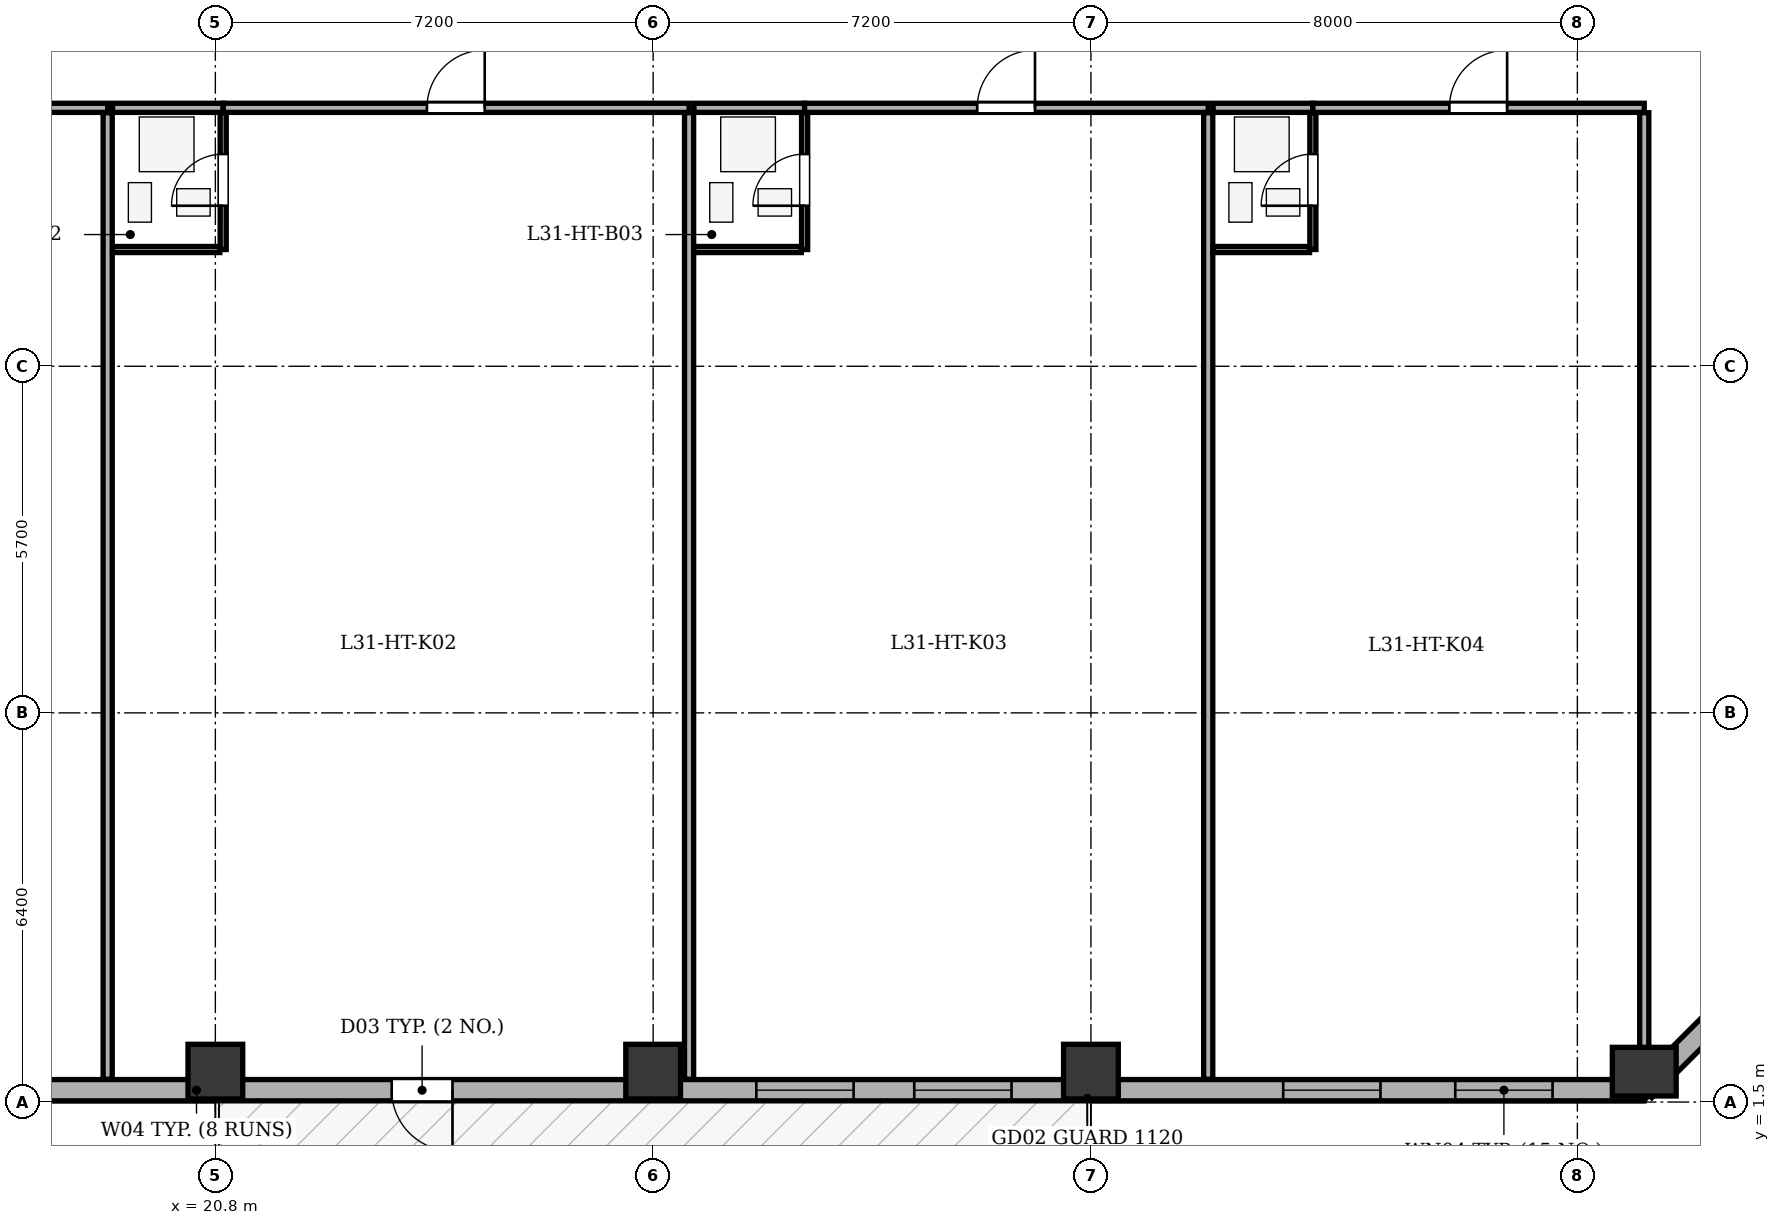
"""IFC4 building model, lengths in metres.
Left out: names, types, materials, properties, quantities, classifications, styles, units other than length and angle.
Written with IfcOpenShell. Run it as: python <this file> out.ifc"""

import sys

from ifc_helpers import new_model, si_unit, direction, frame, frame_2d, origin, origin_2d, place, context, subcontext, project, spatial, rectangle, extrude, element, fill, save


model = new_model("IFC4")
c1 = context("Model", 3, precision=1e-05, world=origin(), true_north=direction((0.0, 1.0)))
c2 = subcontext(c1, "Body", "Model", "MODEL_VIEW")
j1 = project(units=[si_unit("LENGTHUNIT", "METRE"), si_unit("PLANEANGLEUNIT", "RADIAN")], contexts=[c1])
p1 = place(None, origin())
s1 = spatial("IfcSite", under=j1, at=p1, CompositionType="ELEMENT")
p2 = place(p1, origin())
s2 = spatial("IfcBuilding", under=s1, at=p2, CompositionType="ELEMENT")
p3 = place(p2, frame((0.0, 0.0, 127.3)))
s3 = spatial("IfcBuildingStorey", under=s2, at=p3, CompositionType="ELEMENT", Elevation=127.3)
for number, where, z_axis, x_axis in (
    (1, (20.8, 2.0, 0.0), (0.0, 0.0, 1.0), (1.0, 0.0, 0.0)),
    (2, (28.0, 2.0, 0.0), (0.0, 0.0, 1.0), (1.0, 0.0, 0.0)),
    (3, (35.2, 2.0, 0.0), (0.0, 0.0, 1.0), (1.0, 0.0, 0.0)),
):
    element("IfcColumn", number, at=place(p3, frame(where, z_axis=z_axis, x_axis=x_axis)), inside=s3, PredefinedType="COLUMN", context=c2, shape_type="SweptSolid", body=[
        extrude(rectangle(XDim=0.9, YDim=0.9, at=origin_2d()), origin(), (0.0, 0.0, 1.0), 3.5),
    ])
p4 = place(p3, frame((44.3, 2.0, 0.0), z_axis=(0.0, 0.0, 1.0), x_axis=(1.0, 0.0, 0.0)))
e4 = element("IfcColumn", 4, at=p4, inside=s3, PredefinedType="COLUMN", context=c2, shape_type="SweptSolid", body=[
    extrude(rectangle(XDim=0.8, YDim=1.05, at=origin_2d()), origin(), (0.0, 0.0, 1.0), 3.5),
])
p5 = place(p3, frame((44.3, 1.695, 0.0), z_axis=(0.0, 0.0, 1.0), x_axis=(-1.0, 0.0, 0.0)))
e5 = element("IfcWall", 5, at=p5, inside=s3, PredefinedType="STANDARD", context=c2, shape_type="SweptSolid", body=[
    extrude(rectangle(XDim=35.0, YDim=0.35, at=frame_2d((17.5, 0.0))), origin(), (0.0, 0.0, 1.0), 2.785),
])
p6 = place(p5, frame((19.6, 0.0, 0.0)))
e6 = element("IfcOpeningElement", 6, at=p6, cuts=e5, PredefinedType="OPENING", context=c2, shape_type="SweptSolid", body=[
    extrude(rectangle(XDim=1.0, YDim=2.02, at=frame_2d((0.5, 1.01))), frame((0.0, 0.185, 0.0), z_axis=(0.0, -1.0, 0.0), x_axis=(1.0, 0.0, 0.0)), (0.0, 0.0, 1.0), 0.37),
])
p7 = place(p5, frame((1.508, 0.0, 0.75)))
e7 = element("IfcOpeningElement", 7, at=p7, cuts=e5, PredefinedType="OPENING", context=c2, shape_type="SweptSolid", body=[
    extrude(rectangle(XDim=1.6, YDim=1.75, at=frame_2d((0.8, 0.875))), frame((0.0, 0.185, 0.0), z_axis=(0.0, -1.0, 0.0), x_axis=(1.0, 0.0, 0.0)), (0.0, 0.0, 1.0), 0.37),
])
p8 = place(p5, frame((4.338, 0.0, 0.75)))
e8 = element("IfcOpeningElement", 8, at=p8, cuts=e5, PredefinedType="OPENING", context=c2, shape_type="SweptSolid", body=[
    extrude(rectangle(XDim=1.6, YDim=1.75, at=frame_2d((0.8, 0.875))), frame((0.0, 0.185, 0.0), z_axis=(0.0, -1.0, 0.0), x_axis=(1.0, 0.0, 0.0)), (0.0, 0.0, 1.0), 0.37),
])
p9 = place(p5, frame((10.406, 0.0, 0.75)))
e9 = element("IfcOpeningElement", 9, at=p9, cuts=e5, PredefinedType="OPENING", context=c2, shape_type="SweptSolid", body=[
    extrude(rectangle(XDim=1.6, YDim=1.75, at=frame_2d((0.8, 0.875))), frame((0.0, 0.185, 0.0), z_axis=(0.0, -1.0, 0.0), x_axis=(1.0, 0.0, 0.0)), (0.0, 0.0, 1.0), 0.37),
])
p10 = place(p5, frame((13.003, 0.0, 0.75)))
e10 = element("IfcOpeningElement", 10, at=p10, cuts=e5, PredefinedType="OPENING", context=c2, shape_type="SweptSolid", body=[
    extrude(rectangle(XDim=1.6, YDim=1.75, at=frame_2d((0.8, 0.875))), frame((0.0, 0.185, 0.0), z_axis=(0.0, -1.0, 0.0), x_axis=(1.0, 0.0, 0.0)), (0.0, 0.0, 1.0), 0.37),
])
p11 = place(p5, frame((27.02, 0.0, 0.75)))
e11 = element("IfcOpeningElement", 11, at=p11, cuts=e5, PredefinedType="OPENING", context=c2, shape_type="SweptSolid", body=[
    extrude(rectangle(XDim=1.6, YDim=1.75, at=frame_2d((0.8, 0.875))), frame((0.0, 0.185, 0.0), z_axis=(0.0, -1.0, 0.0), x_axis=(1.0, 0.0, 0.0)), (0.0, 0.0, 1.0), 0.37),
])
p12 = place(p5, frame((30.551, 0.0, 0.75)))
e12 = element("IfcOpeningElement", 12, at=p12, cuts=e5, PredefinedType="OPENING", context=c2, shape_type="SweptSolid", body=[
    extrude(rectangle(XDim=2.1, YDim=1.75, at=frame_2d((1.05, 0.875))), frame((0.0, 0.185, 0.0), z_axis=(0.0, -1.0, 0.0), x_axis=(1.0, 0.0, 0.0)), (0.0, 0.0, 1.0), 0.37),
])
p13 = place(p3, frame((49.105, 6.5, 0.0), z_axis=(0.0, 0.0, 1.0), x_axis=(-0.707106781187, -0.707106781187, 0.0)))
e13 = element("IfcWall", 13, at=p13, inside=s3, PredefinedType="STANDARD", context=c2, shape_type="SweptSolid", body=[
    extrude(rectangle(XDim=6.795, YDim=0.35, at=frame_2d((3.397, 0.0))), origin(), (0.0, 0.0, 1.0), 2.785),
])
p14 = place(p13, frame((2.698, 0.0, 0.75)))
e14 = element("IfcOpeningElement", 14, at=p14, cuts=e13, PredefinedType="OPENING", context=c2, shape_type="SweptSolid", body=[
    extrude(rectangle(XDim=1.4, YDim=1.65, at=frame_2d((0.7, 0.825))), frame((0.0, 0.185, 0.0), z_axis=(0.0, -1.0, 0.0), x_axis=(1.0, 0.0, 0.0)), (0.0, 0.0, 1.0), 0.37),
])
p15 = place(p3, frame((12.05, 17.85, 0.0), z_axis=(0.0, 0.0, 1.0), x_axis=(1.0, 0.0, 0.0)))
e15 = element("IfcWall", 15, at=p15, inside=s3, PredefinedType="PARTITIONING", context=c2, shape_type="SweptSolid", body=[
    extrude(rectangle(XDim=6.979, YDim=0.15, at=frame_2d((3.49, 0.0))), origin(), (0.0, 0.0, 1.0), 3.2),
])
p16 = place(p15, frame((3.01, 0.0, 0.0)))
e16 = element("IfcOpeningElement", 16, at=p16, cuts=e15, PredefinedType="OPENING", context=c2, shape_type="SweptSolid", body=[
    extrude(rectangle(XDim=0.95, YDim=2.1, at=frame_2d((0.475, 1.05))), frame((0.0, 0.085, 0.0), z_axis=(0.0, -1.0, 0.0), x_axis=(1.0, 0.0, 0.0)), (0.0, 0.0, 1.0), 0.17),
])
p17 = place(p3, frame((19.029, 1.875, 0.0), z_axis=(0.0, 0.0, 1.0), x_axis=(0.0, 1.0, 0.0)))
e17 = element("IfcWall", 17, at=p17, inside=s3, PredefinedType="PARTITIONING", context=c2, shape_type="SweptSolid", body=[
    extrude(rectangle(XDim=15.895, YDim=0.15, at=frame_2d((7.948, 0.0))), origin(), (0.0, 0.0, 1.0), 3.2),
])
p18 = place(p3, frame((19.109, 17.85, 0.0), z_axis=(0.0, 0.0, 1.0), x_axis=(1.0, 0.0, 0.0)))
e18 = element("IfcWall", 18, at=p18, inside=s3, PredefinedType="PARTITIONING", context=c2, shape_type="SweptSolid", body=[
    extrude(rectangle(XDim=1.82, YDim=0.15, at=frame_2d((0.91, 0.0))), origin(), (0.0, 0.0, 1.0), 3.2),
])
p19 = place(p3, frame((20.929, 17.85, 0.0), z_axis=(0.0, 0.0, 1.0), x_axis=(1.0, 0.0, 0.0)))
e19 = element("IfcWall", 19, at=p19, inside=s3, PredefinedType="PARTITIONING", context=c2, shape_type="SweptSolid", body=[
    extrude(rectangle(XDim=7.662, YDim=0.15, at=frame_2d((3.831, 0.0))), origin(), (0.0, 0.0, 1.0), 3.2),
])
p20 = place(p19, frame((3.351, 0.0, 0.0)))
e20 = element("IfcOpeningElement", 20, at=p20, cuts=e19, PredefinedType="OPENING", context=c2, shape_type="SweptSolid", body=[
    extrude(rectangle(XDim=0.95, YDim=2.1, at=frame_2d((0.475, 1.05))), frame((0.0, 0.085, 0.0), z_axis=(0.0, -1.0, 0.0), x_axis=(1.0, 0.0, 0.0)), (0.0, 0.0, 1.0), 0.17),
])
p21 = place(p3, frame((20.929, 15.52, 0.0), z_axis=(0.0, 0.0, 1.0), x_axis=(0.0, 1.0, 0.0)))
e21 = element("IfcWall", 21, at=p21, inside=s3, PredefinedType="PARTITIONING", context=c2, shape_type="SweptSolid", body=[
    extrude(rectangle(XDim=2.25, YDim=0.1, at=frame_2d((1.125, 0.0))), origin(), (0.0, 0.0, 1.0), 2.535),
])
p22 = place(p21, frame((0.72, 0.0, 0.0)))
e22 = element("IfcOpeningElement", 22, at=p22, cuts=e21, PredefinedType="OPENING", context=c2, shape_type="SweptSolid", body=[
    extrude(rectangle(XDim=0.85, YDim=2.05, at=frame_2d((0.425, 1.025))), frame((0.0, 0.06, 0.0), z_axis=(0.0, -1.0, 0.0), x_axis=(1.0, 0.0, 0.0)), (0.0, 0.0, 1.0), 0.12),
])
p23 = place(p3, frame((19.109, 15.52, 0.0), z_axis=(0.0, 0.0, 1.0), x_axis=(1.0, 0.0, 0.0)))
e23 = element("IfcWall", 23, at=p23, inside=s3, PredefinedType="PARTITIONING", context=c2, shape_type="SweptSolid", body=[
    extrude(rectangle(XDim=1.765, YDim=0.1, at=frame_2d((0.883, 0.0))), origin(), (0.0, 0.0, 1.0), 3.2),
])
p24 = place(p3, frame((28.591, 1.875, 0.0), z_axis=(0.0, 0.0, 1.0), x_axis=(0.0, 1.0, 0.0)))
e24 = element("IfcWall", 24, at=p24, inside=s3, PredefinedType="PARTITIONING", context=c2, shape_type="SweptSolid", body=[
    extrude(rectangle(XDim=15.895, YDim=0.15, at=frame_2d((7.948, 0.0))), origin(), (0.0, 0.0, 1.0), 3.2),
])
p25 = place(p3, frame((28.671, 17.85, 0.0), z_axis=(0.0, 0.0, 1.0), x_axis=(1.0, 0.0, 0.0)))
e25 = element("IfcWall", 25, at=p25, inside=s3, PredefinedType="PARTITIONING", context=c2, shape_type="SweptSolid", body=[
    extrude(rectangle(XDim=1.82, YDim=0.15, at=frame_2d((0.91, 0.0))), origin(), (0.0, 0.0, 1.0), 3.2),
])
p26 = place(p3, frame((30.491, 17.85, 0.0), z_axis=(0.0, 0.0, 1.0), x_axis=(1.0, 0.0, 0.0)))
e26 = element("IfcWall", 26, at=p26, inside=s3, PredefinedType="PARTITIONING", context=c2, shape_type="SweptSolid", body=[
    extrude(rectangle(XDim=6.638, YDim=0.15, at=frame_2d((3.319, 0.0))), origin(), (0.0, 0.0, 1.0), 3.2),
])
p27 = place(p26, frame((2.839, 0.0, 0.0)))
e27 = element("IfcOpeningElement", 27, at=p27, cuts=e26, PredefinedType="OPENING", context=c2, shape_type="SweptSolid", body=[
    extrude(rectangle(XDim=0.95, YDim=2.1, at=frame_2d((0.475, 1.05))), frame((0.0, 0.085, 0.0), z_axis=(0.0, -1.0, 0.0), x_axis=(1.0, 0.0, 0.0)), (0.0, 0.0, 1.0), 0.17),
])
p28 = place(p3, frame((30.491, 15.52, 0.0), z_axis=(0.0, 0.0, 1.0), x_axis=(0.0, 1.0, 0.0)))
e28 = element("IfcWall", 28, at=p28, inside=s3, PredefinedType="PARTITIONING", context=c2, shape_type="SweptSolid", body=[
    extrude(rectangle(XDim=2.25, YDim=0.1, at=frame_2d((1.125, 0.0))), origin(), (0.0, 0.0, 1.0), 3.2),
])
p29 = place(p28, frame((0.72, 0.0, 0.0)))
e29 = element("IfcOpeningElement", 29, at=p29, cuts=e28, PredefinedType="OPENING", context=c2, shape_type="SweptSolid", body=[
    extrude(rectangle(XDim=0.85, YDim=2.05, at=frame_2d((0.425, 1.025))), frame((0.0, 0.06, 0.0), z_axis=(0.0, -1.0, 0.0), x_axis=(1.0, 0.0, 0.0)), (0.0, 0.0, 1.0), 0.12),
])
p30 = place(p3, frame((28.671, 15.52, 0.0), z_axis=(0.0, 0.0, 1.0), x_axis=(1.0, 0.0, 0.0)))
e30 = element("IfcWall", 30, at=p30, inside=s3, PredefinedType="PARTITIONING", context=c2, shape_type="SweptSolid", body=[
    extrude(rectangle(XDim=1.765, YDim=0.1, at=frame_2d((0.883, 0.0))), origin(), (0.0, 0.0, 1.0), 3.2),
])
p31 = place(p3, frame((37.129, 1.875, 0.0), z_axis=(0.0, 0.0, 1.0), x_axis=(0.0, 1.0, 0.0)))
e31 = element("IfcWall", 31, at=p31, inside=s3, PredefinedType="PARTITIONING", context=c2, shape_type="SweptSolid", body=[
    extrude(rectangle(XDim=15.895, YDim=0.15, at=frame_2d((7.948, 0.0))), origin(), (0.0, 0.0, 1.0), 3.2),
])
p32 = place(p3, frame((37.209, 17.85, 0.0), z_axis=(0.0, 0.0, 1.0), x_axis=(1.0, 0.0, 0.0)))
e32 = element("IfcWall", 32, at=p32, inside=s3, PredefinedType="PARTITIONING", context=c2, shape_type="SweptSolid", body=[
    extrude(rectangle(XDim=1.641, YDim=0.15, at=frame_2d((0.821, 0.0))), origin(), (0.0, 0.0, 1.0), 3.2),
])
p33 = place(p3, frame((38.85, 17.85, 0.0), z_axis=(0.0, 0.0, 1.0), x_axis=(1.0, 0.0, 0.0)))
e33 = element("IfcWall", 33, at=p33, inside=s3, PredefinedType="PARTITIONING", context=c2, shape_type="SweptSolid", body=[
    extrude(rectangle(XDim=5.45, YDim=0.15, at=frame_2d((2.725, 0.0))), origin(), (0.0, 0.0, 1.0), 3.2),
])
p34 = place(p33, frame((2.245, 0.0, 0.0)))
e34 = element("IfcOpeningElement", 34, at=p34, cuts=e33, PredefinedType="OPENING", context=c2, shape_type="SweptSolid", body=[
    extrude(rectangle(XDim=0.95, YDim=2.1, at=frame_2d((0.475, 1.05))), frame((0.0, 0.085, 0.0), z_axis=(0.0, -1.0, 0.0), x_axis=(1.0, 0.0, 0.0)), (0.0, 0.0, 1.0), 0.17),
])
p35 = place(p3, frame((38.85, 15.52, 0.0), z_axis=(0.0, 0.0, 1.0), x_axis=(0.0, 1.0, 0.0)))
e35 = element("IfcWall", 35, at=p35, inside=s3, PredefinedType="PARTITIONING", context=c2, shape_type="SweptSolid", body=[
    extrude(rectangle(XDim=2.25, YDim=0.1, at=frame_2d((1.125, 0.0))), origin(), (0.0, 0.0, 1.0), 3.2),
])
p36 = place(p35, frame((0.72, 0.0, 0.0)))
e36 = element("IfcOpeningElement", 36, at=p36, cuts=e35, PredefinedType="OPENING", context=c2, shape_type="SweptSolid", body=[
    extrude(rectangle(XDim=0.85, YDim=2.05, at=frame_2d((0.425, 1.025))), frame((0.0, 0.06, 0.0), z_axis=(0.0, -1.0, 0.0), x_axis=(1.0, 0.0, 0.0)), (0.0, 0.0, 1.0), 0.12),
])
p37 = place(p3, frame((37.209, 15.52, 0.0), z_axis=(0.0, 0.0, 1.0), x_axis=(1.0, 0.0, 0.0)))
e37 = element("IfcWall", 37, at=p37, inside=s3, PredefinedType="PARTITIONING", context=c2, shape_type="SweptSolid", body=[
    extrude(rectangle(XDim=1.586, YDim=0.1, at=frame_2d((0.793, 0.0))), origin(), (0.0, 0.0, 1.0), 3.2),
])
p38 = place(p3, frame((44.3, 1.875, 0.0), z_axis=(0.0, 0.0, 1.0), x_axis=(0.0, 1.0, 0.0)))
e38 = element("IfcWall", 38, at=p38, inside=s3, PredefinedType="PARTITIONING", context=c2, shape_type="SweptSolid", body=[
    extrude(rectangle(XDim=15.895, YDim=0.15, at=frame_2d((7.948, 0.0))), origin(), (0.0, 0.0, 1.0), 3.2),
])
p39 = place(p6, origin())
e39 = element("IfcDoor", 39, at=p39, inside=s3, OperationType="SINGLE_SWING_LEFT", PredefinedType="DOOR", context=c2, shape_type="SweptSolid", body=[
    extrude(rectangle(XDim=1.0, YDim=2.02, at=frame_2d((0.5, 1.01))), frame((0.0, 0.025, 0.0), z_axis=(0.0, -1.0, 0.0), x_axis=(1.0, 0.0, 0.0)), (0.0, 0.0, 1.0), 0.05),
])
fill(e6, e39)
p40 = place(p7, origin())
e40 = element("IfcWindow", 40, at=p40, inside=s3, PartitioningType="SINGLE_PANEL", PredefinedType="WINDOW", context=c2, shape_type="SweptSolid", body=[
    extrude(rectangle(XDim=1.6, YDim=1.75, at=frame_2d((0.8, 0.875))), frame((0.0, -0.01, 0.0), z_axis=(0.0, -1.0, 0.0), x_axis=(1.0, 0.0, 0.0)), (0.0, 0.0, 1.0), 0.06),
])
fill(e7, e40)
p41 = place(p8, origin())
e41 = element("IfcWindow", 41, at=p41, inside=s3, PartitioningType="SINGLE_PANEL", PredefinedType="WINDOW", context=c2, shape_type="SweptSolid", body=[
    extrude(rectangle(XDim=1.6, YDim=1.75, at=frame_2d((0.8, 0.875))), frame((0.0, -0.01, 0.0), z_axis=(0.0, -1.0, 0.0), x_axis=(1.0, 0.0, 0.0)), (0.0, 0.0, 1.0), 0.06),
])
fill(e8, e41)
p42 = place(p9, origin())
e42 = element("IfcWindow", 42, at=p42, inside=s3, PartitioningType="SINGLE_PANEL", PredefinedType="WINDOW", context=c2, shape_type="SweptSolid", body=[
    extrude(rectangle(XDim=1.6, YDim=1.75, at=frame_2d((0.8, 0.875))), frame((0.0, -0.01, 0.0), z_axis=(0.0, -1.0, 0.0), x_axis=(1.0, 0.0, 0.0)), (0.0, 0.0, 1.0), 0.06),
])
fill(e9, e42)
p43 = place(p10, origin())
e43 = element("IfcWindow", 43, at=p43, inside=s3, PartitioningType="SINGLE_PANEL", PredefinedType="WINDOW", context=c2, shape_type="SweptSolid", body=[
    extrude(rectangle(XDim=1.6, YDim=1.75, at=frame_2d((0.8, 0.875))), frame((0.0, -0.01, 0.0), z_axis=(0.0, -1.0, 0.0), x_axis=(1.0, 0.0, 0.0)), (0.0, 0.0, 1.0), 0.06),
])
fill(e10, e43)
p44 = place(p22, origin())
e44 = element("IfcDoor", 44, at=p44, inside=s3, OperationType="SINGLE_SWING_LEFT", PredefinedType="DOOR", context=c2, shape_type="SweptSolid", body=[
    extrude(rectangle(XDim=0.85, YDim=2.05, at=frame_2d((0.425, 1.025))), frame((0.0, 0.025, 0.0), z_axis=(0.0, -1.0, 0.0), x_axis=(1.0, 0.0, 0.0)), (0.0, 0.0, 1.0), 0.05),
])
fill(e22, e44)
p45 = place(p20, origin())
e45 = element("IfcDoor", 45, at=p45, inside=s3, OperationType="SINGLE_SWING_RIGHT", PredefinedType="DOOR", context=c2, shape_type="SweptSolid", body=[
    extrude(rectangle(XDim=0.95, YDim=2.1, at=frame_2d((0.475, 1.05))), frame((0.0, 0.025, 0.0), z_axis=(0.0, -1.0, 0.0), x_axis=(1.0, 0.0, 0.0)), (0.0, 0.0, 1.0), 0.05),
])
fill(e20, e45)
p46 = place(p29, origin())
e46 = element("IfcDoor", 46, at=p46, inside=s3, OperationType="SINGLE_SWING_LEFT", PredefinedType="DOOR", context=c2, shape_type="SweptSolid", body=[
    extrude(rectangle(XDim=0.85, YDim=2.05, at=frame_2d((0.425, 1.025))), frame((0.0, 0.025, 0.0), z_axis=(0.0, -1.0, 0.0), x_axis=(1.0, 0.0, 0.0)), (0.0, 0.0, 1.0), 0.05),
])
fill(e29, e46)
p47 = place(p27, origin())
e47 = element("IfcDoor", 47, at=p47, inside=s3, OperationType="SINGLE_SWING_RIGHT", PredefinedType="DOOR", context=c2, shape_type="SweptSolid", body=[
    extrude(rectangle(XDim=0.95, YDim=2.1, at=frame_2d((0.475, 1.05))), frame((0.0, 0.025, 0.0), z_axis=(0.0, -1.0, 0.0), x_axis=(1.0, 0.0, 0.0)), (0.0, 0.0, 1.0), 0.05),
])
fill(e27, e47)
p48 = place(p36, origin())
e48 = element("IfcDoor", 48, at=p48, inside=s3, OperationType="SINGLE_SWING_LEFT", PredefinedType="DOOR", context=c2, shape_type="SweptSolid", body=[
    extrude(rectangle(XDim=0.85, YDim=2.05, at=frame_2d((0.425, 1.025))), frame((0.0, 0.025, 0.0), z_axis=(0.0, -1.0, 0.0), x_axis=(1.0, 0.0, 0.0)), (0.0, 0.0, 1.0), 0.05),
])
fill(e36, e48)
p49 = place(p34, origin())
e49 = element("IfcDoor", 49, at=p49, inside=s3, OperationType="SINGLE_SWING_RIGHT", PredefinedType="DOOR", context=c2, shape_type="SweptSolid", body=[
    extrude(rectangle(XDim=0.95, YDim=2.1, at=frame_2d((0.475, 1.05))), frame((0.0, 0.025, 0.0), z_axis=(0.0, -1.0, 0.0), x_axis=(1.0, 0.0, 0.0)), (0.0, 0.0, 1.0), 0.05),
])
fill(e34, e49)
save(model, sys.argv[1])
